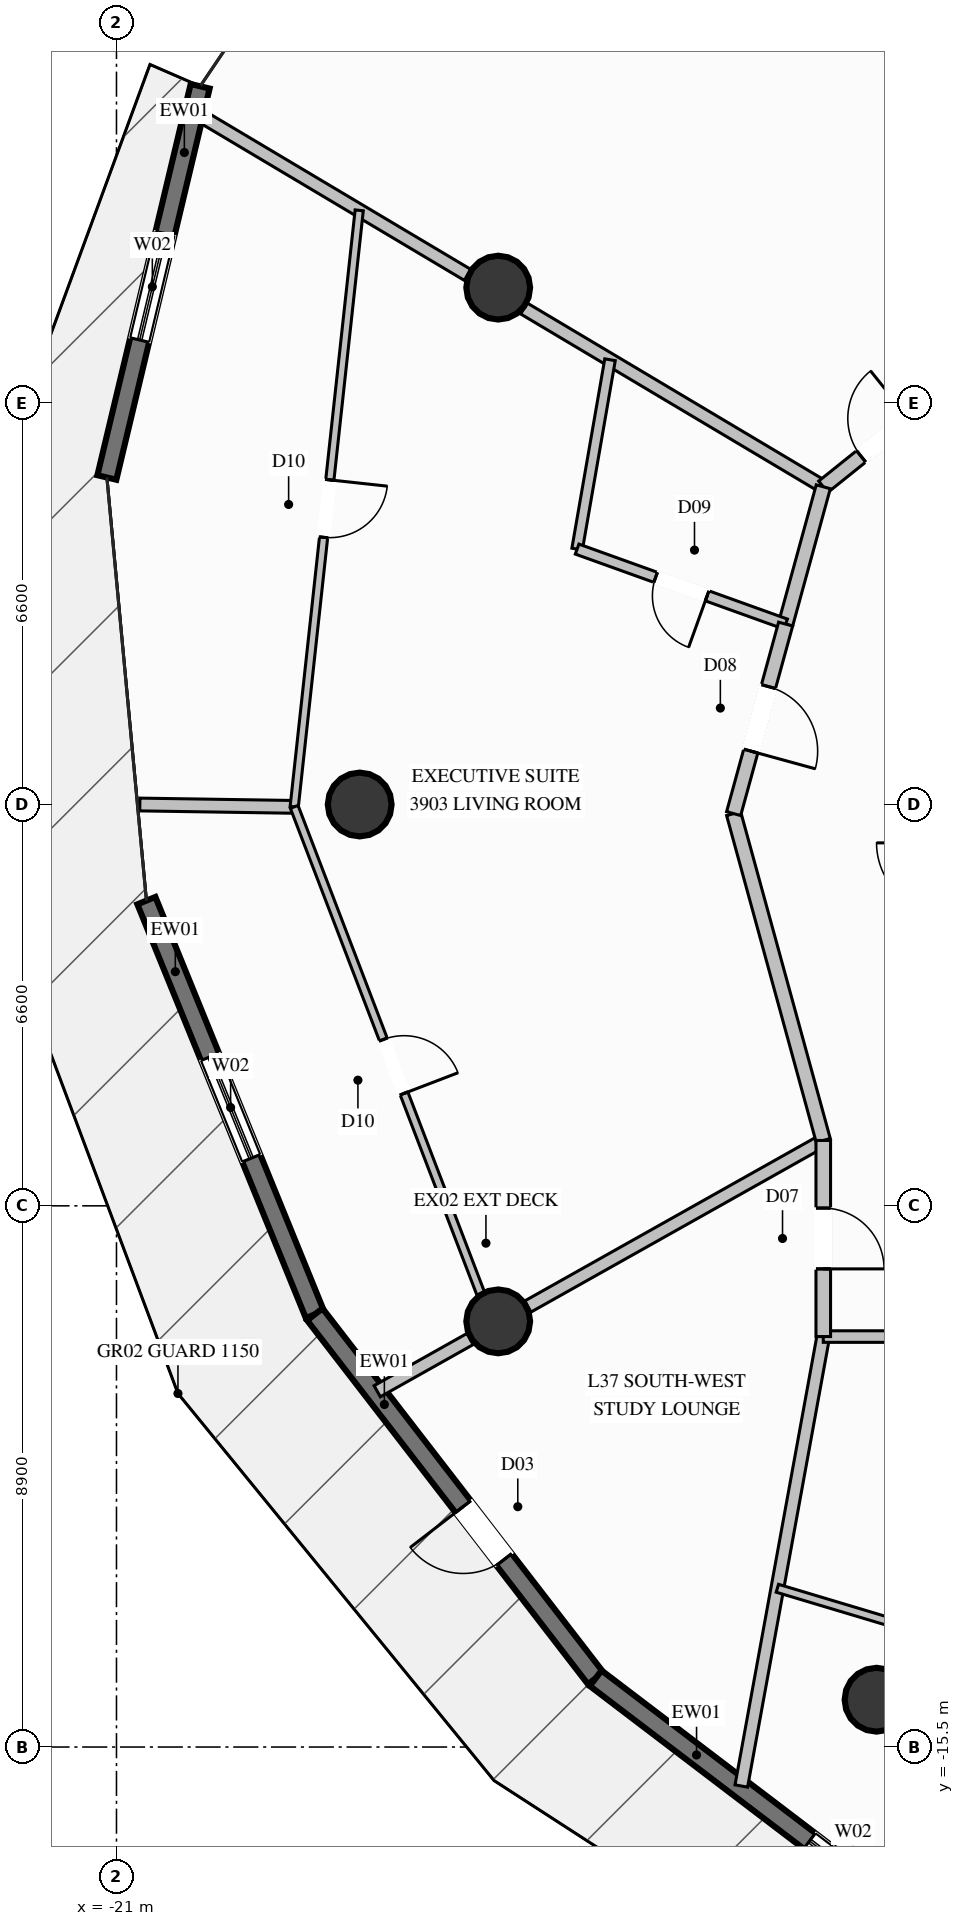
"""IFC4 building model, lengths in metres.
Left out: names, types, materials, properties, quantities, classifications, styles, units other than length and angle.
Written with IfcOpenShell. Run it as: python <this file> out.ifc"""

import sys

from ifc_helpers import new_model, si_unit, direction, frame, frame_2d, origin, origin_2d, place, context, subcontext, project, spatial, rectangle, circle, extrude, element, fill, save


model = new_model("IFC4")
c1 = context("Model", 3, precision=1e-05, world=origin(), true_north=direction((0.0, 1.0)))
c2 = subcontext(c1, "Body", "Model", "MODEL_VIEW")
j1 = project(units=[si_unit("LENGTHUNIT", "METRE"), si_unit("PLANEANGLEUNIT", "RADIAN")], contexts=[c1])
p1 = place(None, origin())
s1 = spatial("IfcSite", under=j1, at=p1, CompositionType="ELEMENT")
p2 = place(p1, origin())
s2 = spatial("IfcBuilding", under=s1, at=p2, CompositionType="ELEMENT")
p3 = place(p2, frame((0.0, 0.0, 145.8)))
s3 = spatial("IfcBuildingStorey", under=s2, at=p3, CompositionType="ELEMENT", Elevation=145.8)
for number, where, z_axis, x_axis in (
    (1, (-14.722, 8.5, 0.0), (0.0, 0.0, 1.0), (1.0, 0.0, 0.0)),
    (2, (-17.0, 0.0, 0.0), (0.0, 0.0, 1.0), (1.0, 0.0, 0.0)),
    (3, (-14.722, -8.5, 0.0), (0.0, 0.0, 1.0), (1.0, 0.0, 0.0)),
    (4, (-8.5, -14.722, 0.0), (0.0, 0.0, 1.0), (1.0, 0.0, 0.0)),
):
    element("IfcColumn", number, at=place(p3, frame(where, z_axis=z_axis, x_axis=x_axis)), inside=s3, PredefinedType="COLUMN", context=c2, shape_type="SweptSolid", body=[
        extrude(circle(Radius=0.525, at=origin_2d()), origin(), (0.0, 0.0, 1.0), 3.6),
    ])
p4 = place(p3, frame((-21.158, 5.378, 0.0), z_axis=(0.0, 0.0, 1.0), x_axis=(0.231941586556, 0.972729716019, 0.0)))
e5 = element("IfcWall", 5, at=p4, inside=s3, PredefinedType="SOLIDWALL", context=c2, shape_type="SweptSolid", body=[
    extrude(rectangle(XDim=6.614, YDim=0.32, at=frame_2d((3.307, 0.0))), origin(), (0.0, 0.0, 1.0), 3.35),
])
p5 = place(p4, frame((2.324, 0.0, 0.35)))
e6 = element("IfcOpeningElement", 6, at=p5, cuts=e5, PredefinedType="OPENING", context=c2, shape_type="SweptSolid", body=[
    extrude(rectangle(XDim=1.8, YDim=2.6, at=frame_2d((0.9, 1.3))), frame((0.0, 0.17, 0.0), z_axis=(0.0, -1.0, 0.0), x_axis=(1.0, 0.0, 0.0)), (0.0, 0.0, 1.0), 0.34),
])
p6 = place(p3, frame((-17.738, -8.385, 0.0), z_axis=(0.0, 0.0, 1.0), x_axis=(-0.377067798902, 0.926185659051, 0.0)))
e7 = element("IfcWall", 7, at=p6, inside=s3, PredefinedType="SOLIDWALL", context=c2, shape_type="SweptSolid", body=[
    extrude(rectangle(XDim=7.346, YDim=0.32, at=frame_2d((3.673, 0.0))), origin(), (0.0, 0.0, 1.0), 3.35),
])
p7 = place(p6, frame((2.773, 0.0, 0.35)))
e8 = element("IfcOpeningElement", 8, at=p7, cuts=e7, PredefinedType="OPENING", context=c2, shape_type="SweptSolid", body=[
    extrude(rectangle(XDim=1.8, YDim=2.6, at=frame_2d((0.9, 1.3))), frame((0.0, 0.17, 0.0), z_axis=(0.0, -1.0, 0.0), x_axis=(1.0, 0.0, 0.0)), (0.0, 0.0, 1.0), 0.34),
])
p8 = place(p3, frame((-13.119, -14.369, 0.0), z_axis=(0.0, 0.0, 1.0), x_axis=(-0.611052177593, 0.791590320973, 0.0)))
e9 = element("IfcWall", 9, at=p8, inside=s3, PredefinedType="SOLIDWALL", context=c2, shape_type="SweptSolid", body=[
    extrude(rectangle(XDim=7.559, YDim=0.32, at=frame_2d((3.78, 0.0))), origin(), (0.0, 0.0, 1.0), 3.35),
])
p9 = place(p8, frame((2.466, 0.0, 0.0)))
e10 = element("IfcOpeningElement", 10, at=p9, cuts=e9, PredefinedType="OPENING", context=c2, shape_type="SweptSolid", body=[
    extrude(rectangle(XDim=1.1, YDim=2.2, at=frame_2d((0.55, 1.1))), frame((0.0, 0.17, 0.0), z_axis=(0.0, -1.0, 0.0), x_axis=(1.0, 0.0, 0.0)), (0.0, 0.0, 1.0), 0.34),
])
p10 = place(p3, frame((-7.103, -18.946, 0.0), z_axis=(0.0, 0.0, 1.0), x_axis=(-0.795837829304, 0.605509826054, 0.0)))
e11 = element("IfcWall", 11, at=p10, inside=s3, PredefinedType="SOLIDWALL", context=c2, shape_type="SweptSolid", body=[
    extrude(rectangle(XDim=7.559, YDim=0.32, at=frame_2d((3.78, 0.0))), origin(), (0.0, 0.0, 1.0), 3.35),
])
p11 = place(p10, frame((1.34, 0.0, 0.35)))
e12 = element("IfcOpeningElement", 12, at=p11, cuts=e11, PredefinedType="OPENING", context=c2, shape_type="SweptSolid", body=[
    extrude(rectangle(XDim=1.8, YDim=2.6, at=frame_2d((0.9, 1.3))), frame((0.0, 0.17, 0.0), z_axis=(0.0, -1.0, 0.0), x_axis=(1.0, 0.0, 0.0)), (0.0, 0.0, 1.0), 0.34),
])
p12 = place(p3, frame((-9.376, 5.225, 0.0), z_axis=(0.0, 0.0, 1.0), x_axis=(-0.859180057994, 0.511673360598, 0.0)))
e13 = element("IfcWall", 13, at=p12, inside=s3, PredefinedType="PARTITIONING", context=c2, shape_type="SweptSolid", body=[
    extrude(rectangle(XDim=5.73, YDim=0.21, at=frame_2d((2.865, 0.0))), origin(), (0.0, 0.0, 1.0), 2.791),
])
p13 = place(p3, frame((-15.225, 8.709, 0.0), z_axis=(0.0, 0.0, 1.0), x_axis=(-0.859183721652, 0.511667208689, 0.0)))
e14 = element("IfcWall", 14, at=p13, inside=s3, PredefinedType="PARTITIONING", context=c2, shape_type="SweptSolid", body=[
    extrude(rectangle(XDim=5.197, YDim=0.21, at=frame_2d((2.598, 0.0))), origin(), (0.0, 0.0, 1.0), 3.35),
])
p14 = place(p3, frame((-9.376, -5.525, 0.0), z_axis=(0.0, 0.0, 1.0), x_axis=(-0.8717334026, -0.489980484092, 0.0)))
e15 = element("IfcWall", 15, at=p14, inside=s3, PredefinedType="PARTITIONING", context=c2, shape_type="SweptSolid", body=[
    extrude(rectangle(XDim=5.574, YDim=0.21, at=frame_2d((2.787, 0.0))), origin(), (0.0, 0.0, 1.0), 2.791),
])
p15 = place(p3, frame((-15.184, -8.79, 0.0), z_axis=(0.0, 0.0, 1.0), x_axis=(-0.871701988745, -0.490036368873, 0.0)))
e16 = element("IfcWall", 16, at=p15, inside=s3, PredefinedType="PARTITIONING", context=c2, shape_type="SweptSolid", body=[
    extrude(rectangle(XDim=1.753, YDim=0.21, at=frame_2d((0.876, 0.0))), origin(), (0.0, 0.0, 1.0), 3.35),
])
p16 = place(p3, frame((-9.376, 5.225, 0.0), z_axis=(0.0, 0.0, 1.0), x_axis=(0.780061082582, 0.625703370169, 0.0)))
e17 = element("IfcWall", 17, at=p16, inside=s3, PredefinedType="PARTITIONING", context=c2, shape_type="SweptSolid", body=[
    extrude(rectangle(XDim=2.597, YDim=0.24, at=frame_2d((1.299, 0.0))), origin(), (0.0, 0.0, 1.0), 3.35),
])
p17 = place(p16, frame((0.799, 0.0, 0.0)))
e18 = element("IfcOpeningElement", 18, at=p17, cuts=e17, PredefinedType="OPENING", context=c2, shape_type="SweptSolid", body=[
    extrude(rectangle(XDim=1.0, YDim=2.2, at=frame_2d((0.5, 1.1))), frame((0.0, 0.13, 0.0), z_axis=(0.0, -1.0, 0.0), x_axis=(1.0, 0.0, 0.0)), (0.0, 0.0, 1.0), 0.26),
])
p18 = place(p3, frame((-9.376, 5.225, 0.0), z_axis=(0.0, 0.0, 1.0), x_axis=(-0.264431780812, -0.964404393031, 0.0)))
e19 = element("IfcWall", 19, at=p18, inside=s3, PredefinedType="PARTITIONING", context=c2, shape_type="SweptSolid", body=[
    extrude(rectangle(XDim=2.341, YDim=0.24, at=frame_2d((1.171, 0.0))), origin(), (0.0, 0.0, 1.0), 3.35),
])
p19 = place(p3, frame((-12.883, 7.314, 0.0), z_axis=(0.0, 0.0, 1.0), x_axis=(-0.171171661644, -0.985241220336, 0.0)))
e20 = element("IfcWall", 20, at=p19, inside=s3, PredefinedType="PLUMBINGWALL", context=c2, shape_type="SweptSolid", body=[
    extrude(rectangle(XDim=3.161, YDim=0.175, at=frame_2d((1.58, 0.0))), origin(), (0.0, 0.0, 1.0), 3.35),
])
p20 = place(p3, frame((-9.995, 2.967, 0.0), z_axis=(0.0, 0.0, 1.0), x_axis=(-0.941019727354, 0.338351699761, 0.0)))
e21 = element("IfcWall", 21, at=p20, inside=s3, PredefinedType="PLUMBINGWALL", context=c2, shape_type="SweptSolid", body=[
    extrude(rectangle(XDim=3.644, YDim=0.175, at=frame_2d((1.822, 0.0))), origin(), (0.0, 0.0, 1.0), 3.35),
])
p21 = place(p20, frame((1.372, 0.0, 0.0)))
e22 = element("IfcOpeningElement", 22, at=p21, cuts=e21, PredefinedType="OPENING", context=c2, shape_type="SweptSolid", body=[
    extrude(rectangle(XDim=0.9, YDim=2.1, at=frame_2d((0.45, 1.05))), frame((0.0, 0.098, 0.0), z_axis=(0.0, -1.0, 0.0), x_axis=(1.0, 0.0, 0.0)), (0.0, 0.0, 1.0), 0.195),
])
p22 = place(p3, frame((-18.077, -0.039, 0.0), z_axis=(0.0, 0.0, 1.0), x_axis=(-0.999881677808, 0.015382795043, 0.0)))
e23 = element("IfcWall", 23, at=p22, inside=s3, PredefinedType="PARTITIONING", context=c2, shape_type="SweptSolid", body=[
    extrude(rectangle(XDim=2.539, YDim=0.21, at=frame_2d((1.27, 0.0))), origin(), (0.0, 0.0, 1.0), 3.35),
])
p23 = place(p3, frame((-10.85, -0.15, 0.0), z_axis=(0.0, 0.0, 1.0), x_axis=(0.264488542062, -0.964388827765, 0.0)))
e24 = element("IfcWall", 24, at=p23, inside=s3, PredefinedType="PARTITIONING", context=c2, shape_type="SweptSolid", body=[
    extrude(rectangle(XDim=5.573, YDim=0.24, at=frame_2d((2.787, 0.0))), origin(), (0.0, 0.0, 1.0), 3.35),
])
p24 = place(p3, frame((-9.995, 2.967, 0.0), z_axis=(0.0, 0.0, 1.0), x_axis=(-0.264529660797, -0.9643775498, 0.0)))
e25 = element("IfcWall", 25, at=p24, inside=s3, PredefinedType="PARTITIONING", context=c2, shape_type="SweptSolid", body=[
    extrude(rectangle(XDim=3.232, YDim=0.24, at=frame_2d((1.616, 0.0))), origin(), (0.0, 0.0, 1.0), 3.35),
])
p25 = place(p24, frame((1.066, 0.0, 0.0)))
e26 = element("IfcOpeningElement", 26, at=p25, cuts=e25, PredefinedType="OPENING", context=c2, shape_type="SweptSolid", body=[
    extrude(rectangle(XDim=1.1, YDim=2.3, at=frame_2d((0.55, 1.15))), frame((0.0, 0.13, 0.0), z_axis=(0.0, -1.0, 0.0), x_axis=(1.0, 0.0, 0.0)), (0.0, 0.0, 1.0), 0.26),
])
p26 = place(p3, frame((-17.008, 9.771, 0.0), z_axis=(0.0, 0.0, 1.0), x_axis=(-0.108313259842, -0.994116812926, 0.0)))
e27 = element("IfcWall", 27, at=p26, inside=s3, PredefinedType="PARTITIONING", context=c2, shape_type="SweptSolid", body=[
    extrude(rectangle(XDim=9.868, YDim=0.135, at=frame_2d((4.934, 0.0))), origin(), (0.0, 0.0, 1.0), 3.35),
])
p27 = place(p26, frame((4.459, 0.0, 0.0)))
e28 = element("IfcOpeningElement", 28, at=p27, cuts=e27, PredefinedType="OPENING", context=c2, shape_type="SweptSolid", body=[
    extrude(rectangle(XDim=0.95, YDim=2.1, at=frame_2d((0.475, 1.05))), frame((0.0, 0.078, 0.0), z_axis=(0.0, -1.0, 0.0), x_axis=(1.0, 0.0, 0.0)), (0.0, 0.0, 1.0), 0.155),
])
p28 = place(p3, frame((-18.077, -0.039, 0.0), z_axis=(0.0, 0.0, 1.0), x_axis=(0.357853364302, -0.933777794584, 0.0)))
e29 = element("IfcWall", 29, at=p28, inside=s3, PredefinedType="PARTITIONING", context=c2, shape_type="SweptSolid", body=[
    extrude(rectangle(XDim=9.143, YDim=0.135, at=frame_2d((4.572, 0.0))), origin(), (0.0, 0.0, 1.0), 2.879),
])
p29 = place(p28, frame((4.097, 0.0, 0.0)))
e30 = element("IfcOpeningElement", 30, at=p29, cuts=e29, PredefinedType="OPENING", context=c2, shape_type="SweptSolid", body=[
    extrude(rectangle(XDim=0.95, YDim=2.1, at=frame_2d((0.475, 1.05))), frame((0.0, 0.078, 0.0), z_axis=(0.0, -1.0, 0.0), x_axis=(1.0, 0.0, 0.0)), (0.0, 0.0, 1.0), 0.155),
])
p30 = place(p3, frame((-9.376, -8.75, 0.0), z_axis=(0.0, 0.0, 1.0), x_axis=(-0.179440173007, -0.983768887652, 0.0)))
e31 = element("IfcWall", 31, at=p30, inside=s3, PredefinedType="PARTITIONING", context=c2, shape_type="SweptSolid", body=[
    extrude(rectangle(XDim=7.513, YDim=0.21, at=frame_2d((3.756, 0.0))), origin(), (0.0, 0.0, 1.0), 3.35),
])
p31 = place(p3, frame((-9.376, -8.75, 0.0), z_axis=(0.0, 0.0, 1.0), x_axis=(1.0, 0.0, 0.0)))
e32 = element("IfcWall", 32, at=p31, inside=s3, PredefinedType="PARTITIONING", context=c2, shape_type="SweptSolid", body=[
    extrude(rectangle(XDim=9.376, YDim=0.19, at=frame_2d((4.688, 0.0))), origin(), (0.0, 0.0, 1.0), 3.35),
])
p32 = place(p31, frame((4.213, 0.0, 0.0)))
e33 = element("IfcOpeningElement", 33, at=p32, cuts=e32, PredefinedType="OPENING", context=c2, shape_type="SweptSolid", body=[
    extrude(rectangle(XDim=0.95, YDim=2.1, at=frame_2d((0.475, 1.05))), frame((0.0, 0.105, 0.0), z_axis=(0.0, -1.0, 0.0), x_axis=(1.0, 0.0, 0.0)), (0.0, 0.0, 1.0), 0.21),
])
p33 = place(p3, frame((-9.376, -5.525, 0.0), z_axis=(0.0, 0.0, 1.0), x_axis=(0.0, -1.0, 0.0)))
e34 = element("IfcWall", 34, at=p33, inside=s3, PredefinedType="PARTITIONING", context=c2, shape_type="SweptSolid", body=[
    extrude(rectangle(XDim=3.225, YDim=0.24, at=frame_2d((1.613, 0.0))), origin(), (0.0, 0.0, 1.0), 3.35),
])
p34 = place(p33, frame((1.112, 0.0, 0.0)))
e35 = element("IfcOpeningElement", 35, at=p34, cuts=e34, PredefinedType="OPENING", context=c2, shape_type="SweptSolid", body=[
    extrude(rectangle(XDim=1.0, YDim=2.2, at=frame_2d((0.5, 1.1))), frame((0.0, 0.13, 0.0), z_axis=(0.0, -1.0, 0.0), x_axis=(1.0, 0.0, 0.0)), (0.0, 0.0, 1.0), 0.26),
])
p35 = place(p3, frame((-10.131, -12.889, 0.0), z_axis=(0.0, 0.0, 1.0), x_axis=(0.957987914755, -0.286808568879, 0.0)))
e36 = element("IfcWall", 36, at=p35, inside=s3, PredefinedType="PARTITIONING", context=c2, shape_type="SweptSolid", body=[
    extrude(rectangle(XDim=10.84, YDim=0.135, at=frame_2d((5.42, 0.0))), origin(), (0.0, 0.0, 1.0), 2.879),
])
p36 = place(p35, frame((4.945, 0.0, 0.0)))
e37 = element("IfcOpeningElement", 37, at=p36, cuts=e36, PredefinedType="OPENING", context=c2, shape_type="SweptSolid", body=[
    extrude(rectangle(XDim=0.95, YDim=2.1, at=frame_2d((0.475, 1.05))), frame((0.0, 0.078, 0.0), z_axis=(0.0, -1.0, 0.0), x_axis=(1.0, 0.0, 0.0)), (0.0, 0.0, 1.0), 0.155),
])
p37 = place(p5, origin())
e38 = element("IfcWindow", 38, at=p37, inside=s3, PartitioningType="SINGLE_PANEL", PredefinedType="WINDOW", context=c2, shape_type="SweptSolid", body=[
    extrude(rectangle(XDim=1.8, YDim=2.6, at=frame_2d((0.9, 1.3))), frame((0.0, 0.03, 0.0), z_axis=(0.0, -1.0, 0.0), x_axis=(1.0, 0.0, 0.0)), (0.0, 0.0, 1.0), 0.06),
])
fill(e6, e38)
p38 = place(p7, origin())
e39 = element("IfcWindow", 39, at=p38, inside=s3, PartitioningType="SINGLE_PANEL", PredefinedType="WINDOW", context=c2, shape_type="SweptSolid", body=[
    extrude(rectangle(XDim=1.8, YDim=2.6, at=frame_2d((0.9, 1.3))), frame((0.0, 0.03, 0.0), z_axis=(0.0, -1.0, 0.0), x_axis=(1.0, 0.0, 0.0)), (0.0, 0.0, 1.0), 0.06),
])
fill(e8, e39)
p39 = place(p9, origin())
e40 = element("IfcDoor", 40, at=p39, inside=s3, OperationType="SINGLE_SWING_RIGHT", PredefinedType="DOOR", context=c2, shape_type="SweptSolid", body=[
    extrude(rectangle(XDim=1.1, YDim=2.2, at=frame_2d((0.55, 1.1))), frame((0.0, 0.025, 0.0), z_axis=(0.0, -1.0, 0.0), x_axis=(1.0, 0.0, 0.0)), (0.0, 0.0, 1.0), 0.05),
])
fill(e10, e40)
p40 = place(p11, origin())
e41 = element("IfcWindow", 41, at=p40, inside=s3, PartitioningType="SINGLE_PANEL", PredefinedType="WINDOW", context=c2, shape_type="SweptSolid", body=[
    extrude(rectangle(XDim=1.8, YDim=2.6, at=frame_2d((0.9, 1.3))), frame((0.0, 0.03, 0.0), z_axis=(0.0, -1.0, 0.0), x_axis=(1.0, 0.0, 0.0)), (0.0, 0.0, 1.0), 0.06),
])
fill(e12, e41)
p41 = place(p17, origin())
e42 = element("IfcDoor", 42, at=p41, inside=s3, OperationType="SINGLE_SWING_RIGHT", PredefinedType="DOOR", context=c2, shape_type="SweptSolid", body=[
    extrude(rectangle(XDim=1.0, YDim=2.2, at=frame_2d((0.5, 1.1))), frame((0.0, 0.025, 0.0), z_axis=(0.0, -1.0, 0.0), x_axis=(1.0, 0.0, 0.0)), (0.0, 0.0, 1.0), 0.05),
])
fill(e18, e42)
p42 = place(p21, origin())
e43 = element("IfcDoor", 43, at=p42, inside=s3, OperationType="SINGLE_SWING_LEFT", PredefinedType="DOOR", context=c2, shape_type="SweptSolid", body=[
    extrude(rectangle(XDim=0.9, YDim=2.1, at=frame_2d((0.45, 1.05))), frame((0.0, 0.025, 0.0), z_axis=(0.0, -1.0, 0.0), x_axis=(1.0, 0.0, 0.0)), (0.0, 0.0, 1.0), 0.05),
])
fill(e22, e43)
p43 = place(p25, origin())
e44 = element("IfcDoor", 44, at=p43, inside=s3, OperationType="SINGLE_SWING_RIGHT", PredefinedType="DOOR", context=c2, shape_type="SweptSolid", body=[
    extrude(rectangle(XDim=1.1, YDim=2.3, at=frame_2d((0.55, 1.15))), frame((0.0, 0.025, 0.0), z_axis=(0.0, -1.0, 0.0), x_axis=(1.0, 0.0, 0.0)), (0.0, 0.0, 1.0), 0.05),
])
fill(e26, e44)
p44 = place(p27, origin())
e45 = element("IfcDoor", 45, at=p44, inside=s3, OperationType="SINGLE_SWING_LEFT", PredefinedType="DOOR", context=c2, shape_type="SweptSolid", body=[
    extrude(rectangle(XDim=0.95, YDim=2.1, at=frame_2d((0.475, 1.05))), frame((0.0, 0.025, 0.0), z_axis=(0.0, -1.0, 0.0), x_axis=(1.0, 0.0, 0.0)), (0.0, 0.0, 1.0), 0.05),
])
fill(e28, e45)
p45 = place(p29, origin())
e46 = element("IfcDoor", 46, at=p45, inside=s3, OperationType="SINGLE_SWING_RIGHT", PredefinedType="DOOR", context=c2, shape_type="SweptSolid", body=[
    extrude(rectangle(XDim=0.95, YDim=2.1, at=frame_2d((0.475, 1.05))), frame((0.0, 0.025, 0.0), z_axis=(0.0, -1.0, 0.0), x_axis=(1.0, 0.0, 0.0)), (0.0, 0.0, 1.0), 0.05),
])
fill(e30, e46)
p46 = place(p34, origin())
e47 = element("IfcDoor", 47, at=p46, inside=s3, OperationType="SINGLE_SWING_RIGHT", PredefinedType="DOOR", context=c2, shape_type="SweptSolid", body=[
    extrude(rectangle(XDim=1.0, YDim=2.2, at=frame_2d((0.5, 1.1))), frame((0.0, 0.025, 0.0), z_axis=(0.0, -1.0, 0.0), x_axis=(1.0, 0.0, 0.0)), (0.0, 0.0, 1.0), 0.05),
])
fill(e35, e47)
save(model, sys.argv[1])
